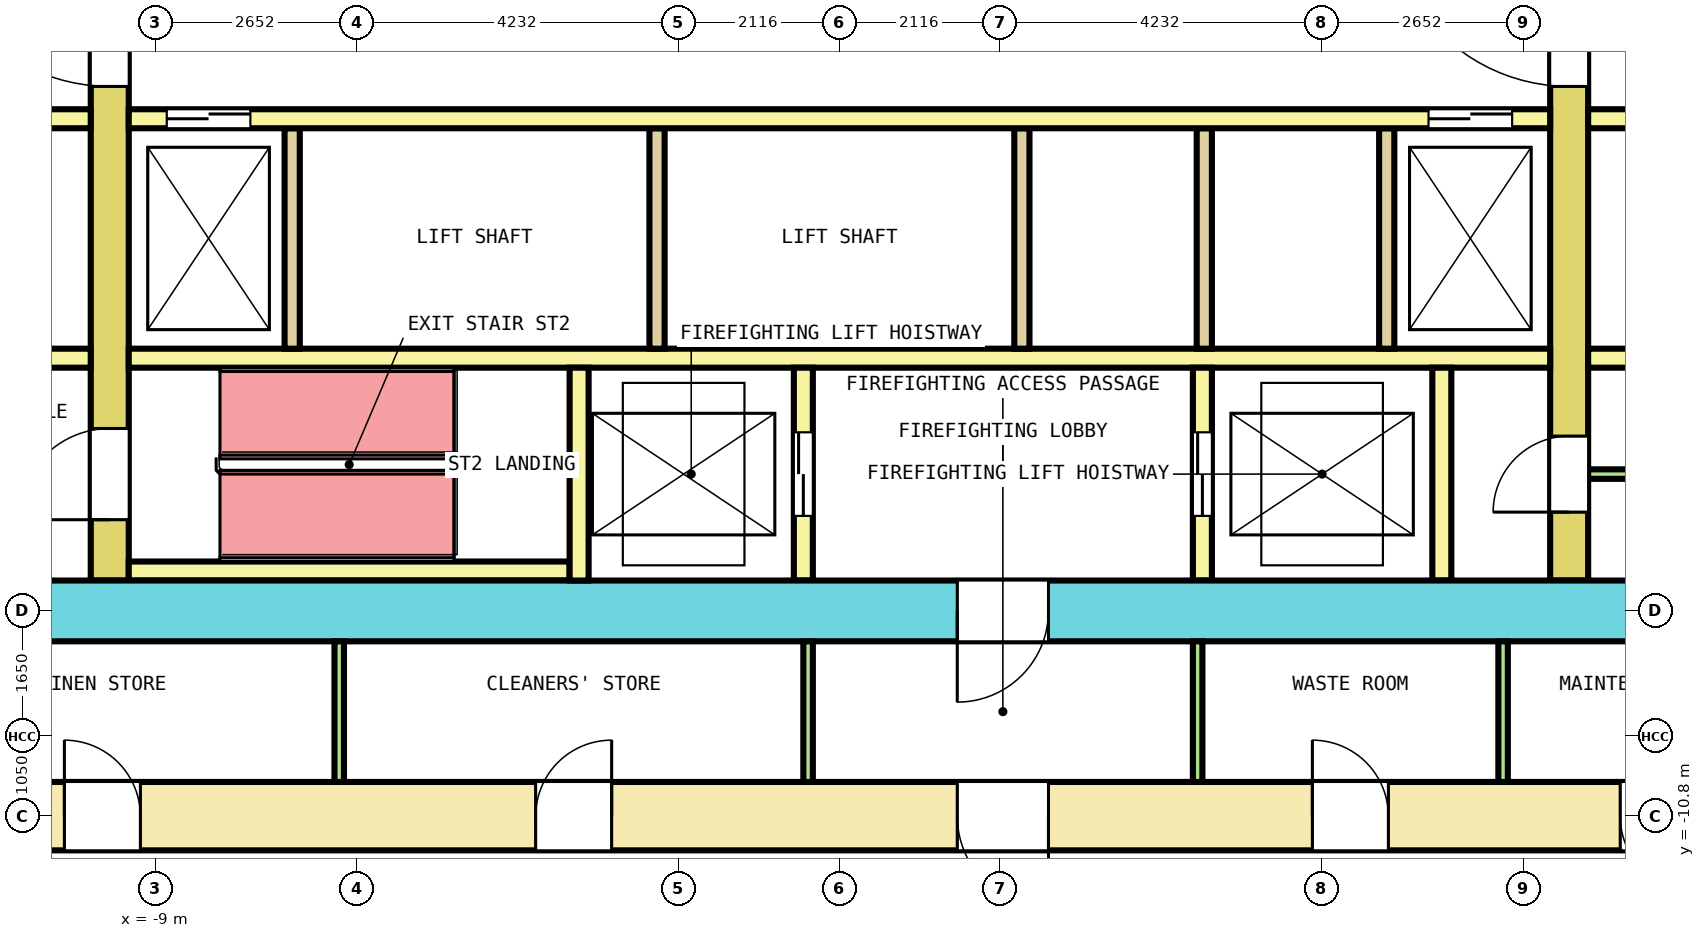
"""IFC4 building model, lengths in metres.
Left out: names, types, materials, properties, quantities, classifications, styles, units other than length and angle.
Written with IfcOpenShell. Run it as: python <this file> out.ifc"""

import sys

from ifc_helpers import new_model, si_unit, direction, frame, frame_2d, origin, place, context, subcontext, project, spatial, rectangle, extrude, element, fill, save


model = new_model("IFC4")
c1 = context("Model", 3, precision=1e-05, world=origin(), true_north=direction((0.0, 1.0)))
c2 = subcontext(c1, "Body", "Model", "MODEL_VIEW")
j1 = project(units=[si_unit("LENGTHUNIT", "METRE"), si_unit("PLANEANGLEUNIT", "RADIAN")], contexts=[c1])
p1 = place(None, origin())
s1 = spatial("IfcSite", under=j1, at=p1, CompositionType="ELEMENT")
p2 = place(p1, origin())
s2 = spatial("IfcBuilding", under=s1, at=p2, CompositionType="ELEMENT")
p3 = place(p2, frame((0.0, 0.0, 27.8)))
s3 = spatial("IfcBuildingStorey", under=s2, at=p3, CompositionType="ELEMENT", Elevation=27.8)
p4 = place(p3, frame((-13.65, -10.8, 0.0), z_axis=(0.0, 0.0, 1.0), x_axis=(1.0, 0.0, 0.0)))
e1 = element("IfcWall", 1, at=p4, inside=s3, PredefinedType="SHEAR", context=c2, shape_type="SweptSolid", body=[
    extrude(rectangle(XDim=27.3, YDim=0.9, at=frame_2d((13.65, 0.0))), origin(), (0.0, 0.0, 1.0), 4.1),
])
p5 = place(p4, frame((3.453, 0.0, 0.0)))
e2 = element("IfcOpeningElement", 2, at=p5, cuts=e1, PredefinedType="OPENING", context=c2, shape_type="SweptSolid", body=[
    extrude(rectangle(XDim=1.0, YDim=2.1, at=frame_2d((0.5, 1.05))), frame((0.0, 0.46, 0.0), z_axis=(0.0, -1.0, 0.0), x_axis=(1.0, 0.0, 0.0)), (0.0, 0.0, 1.0), 0.92),
])
p6 = place(p4, frame((9.653, 0.0, 0.0)))
e3 = element("IfcOpeningElement", 3, at=p6, cuts=e1, PredefinedType="OPENING", context=c2, shape_type="SweptSolid", body=[
    extrude(rectangle(XDim=1.0, YDim=2.1, at=frame_2d((0.5, 1.05))), frame((0.0, 0.46, 0.0), z_axis=(0.0, -1.0, 0.0), x_axis=(1.0, 0.0, 0.0)), (0.0, 0.0, 1.0), 0.92),
])
p7 = place(p4, frame((19.872, 0.0, 0.0)))
e4 = element("IfcOpeningElement", 4, at=p7, cuts=e1, PredefinedType="OPENING", context=c2, shape_type="SweptSolid", body=[
    extrude(rectangle(XDim=1.0, YDim=2.1, at=frame_2d((0.5, 1.05))), frame((0.0, 0.46, 0.0), z_axis=(0.0, -1.0, 0.0), x_axis=(1.0, 0.0, 0.0)), (0.0, 0.0, 1.0), 0.92),
])
p8 = place(p4, frame((23.922, 0.0, 0.0)))
e5 = element("IfcOpeningElement", 5, at=p8, cuts=e1, PredefinedType="OPENING", context=c2, shape_type="SweptSolid", body=[
    extrude(rectangle(XDim=1.0, YDim=2.1, at=frame_2d((0.5, 1.05))), frame((0.0, 0.46, 0.0), z_axis=(0.0, -1.0, 0.0), x_axis=(1.0, 0.0, 0.0)), (0.0, 0.0, 1.0), 0.92),
])
p9 = place(p4, frame((15.2, 0.0, 0.0)))
e6 = element("IfcOpeningElement", 6, at=p9, cuts=e1, PredefinedType="OPENING", context=c2, shape_type="SweptSolid", body=[
    extrude(rectangle(XDim=1.2, YDim=2.1, at=frame_2d((0.6, 1.05))), frame((0.0, 0.46, 0.0), z_axis=(0.0, -1.0, 0.0), x_axis=(1.0, 0.0, 0.0)), (0.0, 0.0, 1.0), 0.92),
])
p10 = place(p3, frame((-12.75, -8.1, 0.0), z_axis=(0.0, 0.0, 1.0), x_axis=(1.0, 0.0, 0.0)))
e7 = element("IfcWall", 7, at=p10, inside=s3, PredefinedType="SHEAR", context=c2, shape_type="SweptSolid", body=[
    extrude(rectangle(XDim=25.5, YDim=0.8, at=frame_2d((12.75, 0.0))), origin(), (0.0, 0.0, 1.0), 4.1),
])
p11 = place(p10, frame((14.3, 0.0, 0.0)))
e8 = element("IfcOpeningElement", 8, at=p11, cuts=e7, PredefinedType="OPENING", context=c2, shape_type="SweptSolid", body=[
    extrude(rectangle(XDim=1.2, YDim=2.1, at=frame_2d((0.6, 1.05))), frame((0.0, 0.41, 0.0), z_axis=(0.0, -1.0, 0.0), x_axis=(1.0, 0.0, 0.0)), (0.0, 0.0, 1.0), 0.82),
])
p12 = place(p3, frame((-9.6, -7.7, 0.0), z_axis=(0.0, 0.0, 1.0), x_axis=(0.0, 1.0, 0.0)))
e9 = element("IfcWall", 9, at=p12, inside=s3, PredefinedType="SHEAR", context=c2, shape_type="SweptSolid", body=[
    extrude(rectangle(XDim=15.4, YDim=0.5, at=frame_2d((7.7, 0.0))), origin(), (0.0, 0.0, 1.0), 4.1),
])
p13 = place(p12, frame((6.5, 0.0, 0.0)))
e10 = element("IfcOpeningElement", 10, at=p13, cuts=e9, PredefinedType="OPENING", context=c2, shape_type="SweptSolid", body=[
    extrude(rectangle(XDim=2.4, YDim=2.1, at=frame_2d((1.2, 1.05))), frame((0.0, 0.26, 0.0), z_axis=(0.0, -1.0, 0.0), x_axis=(1.0, 0.0, 0.0)), (0.0, 0.0, 1.0), 0.52),
])
p14 = place(p12, frame((13.4, 0.0, 0.0)))
e11 = element("IfcOpeningElement", 11, at=p14, cuts=e9, PredefinedType="OPENING", context=c2, shape_type="SweptSolid", body=[
    extrude(rectangle(XDim=1.2, YDim=2.1, at=frame_2d((0.6, 1.05))), frame((0.0, 0.26, 0.0), z_axis=(0.0, -1.0, 0.0), x_axis=(1.0, 0.0, 0.0)), (0.0, 0.0, 1.0), 0.52),
])
p15 = place(p12, frame((0.8, 0.0, 0.0)))
e12 = element("IfcOpeningElement", 12, at=p15, cuts=e9, PredefinedType="OPENING", context=c2, shape_type="SweptSolid", body=[
    extrude(rectangle(XDim=1.2, YDim=2.1, at=frame_2d((0.6, 1.05))), frame((0.0, 0.26, 0.0), z_axis=(0.0, -1.0, 0.0), x_axis=(1.0, 0.0, 0.0)), (0.0, 0.0, 1.0), 0.52),
])
p16 = place(p3, frame((9.6, -7.7, 0.0), z_axis=(0.0, 0.0, 1.0), x_axis=(0.0, 1.0, 0.0)))
e13 = element("IfcWall", 13, at=p16, inside=s3, PredefinedType="SHEAR", context=c2, shape_type="SweptSolid", body=[
    extrude(rectangle(XDim=15.4, YDim=0.5, at=frame_2d((7.7, 0.0))), origin(), (0.0, 0.0, 1.0), 4.1),
])
p17 = place(p16, frame((6.5, 0.0, 0.0)))
e14 = element("IfcOpeningElement", 14, at=p17, cuts=e13, PredefinedType="OPENING", context=c2, shape_type="SweptSolid", body=[
    extrude(rectangle(XDim=2.4, YDim=2.1, at=frame_2d((1.2, 1.05))), frame((0.0, 0.26, 0.0), z_axis=(0.0, -1.0, 0.0), x_axis=(1.0, 0.0, 0.0)), (0.0, 0.0, 1.0), 0.52),
])
p18 = place(p16, frame((13.4, 0.0, 0.0)))
e15 = element("IfcOpeningElement", 15, at=p18, cuts=e13, PredefinedType="OPENING", context=c2, shape_type="SweptSolid", body=[
    extrude(rectangle(XDim=1.2, YDim=2.1, at=frame_2d((0.6, 1.05))), frame((0.0, 0.26, 0.0), z_axis=(0.0, -1.0, 0.0), x_axis=(1.0, 0.0, 0.0)), (0.0, 0.0, 1.0), 0.52),
])
p19 = place(p16, frame((0.9, 0.0, 0.0)))
e16 = element("IfcOpeningElement", 16, at=p19, cuts=e13, PredefinedType="OPENING", context=c2, shape_type="SweptSolid", body=[
    extrude(rectangle(XDim=1.0, YDim=2.1, at=frame_2d((0.5, 1.05))), frame((0.0, 0.26, 0.0), z_axis=(0.0, -1.0, 0.0), x_axis=(1.0, 0.0, 0.0)), (0.0, 0.0, 1.0), 0.52),
])
p20 = place(p3, frame((-12.75, -1.625, 0.0), z_axis=(0.0, 0.0, 1.0), x_axis=(1.0, 0.0, 0.0)))
e17 = element("IfcWall", 17, at=p20, inside=s3, PredefinedType="SOLIDWALL", context=c2, shape_type="SweptSolid", body=[
    extrude(rectangle(XDim=2.9, YDim=0.25, at=frame_2d((1.45, 0.0))), origin(), (0.0, 0.0, 1.0), 4.1),
])
p21 = place(p20, frame((0.9, 0.0, 0.0)))
e18 = element("IfcOpeningElement", 18, at=p21, cuts=e17, PredefinedType="OPENING", context=c2, shape_type="SweptSolid", body=[
    extrude(rectangle(XDim=1.1, YDim=2.1, at=frame_2d((0.55, 1.05))), frame((0.0, 0.135, 0.0), z_axis=(0.0, -1.0, 0.0), x_axis=(1.0, 0.0, 0.0)), (0.0, 0.0, 1.0), 0.27),
])
p22 = place(p3, frame((-9.35, -1.625, 0.0), z_axis=(0.0, 0.0, 1.0), x_axis=(1.0, 0.0, 0.0)))
e19 = element("IfcWall", 19, at=p22, inside=s3, PredefinedType="SOLIDWALL", context=c2, shape_type="SweptSolid", body=[
    extrude(rectangle(XDim=18.7, YDim=0.25, at=frame_2d((9.35, 0.0))), origin(), (0.0, 0.0, 1.0), 4.1),
])
p23 = place(p22, frame((0.5, 0.0, 0.0)))
e20 = element("IfcOpeningElement", 20, at=p23, cuts=e19, PredefinedType="OPENING", context=c2, shape_type="SweptSolid", body=[
    extrude(rectangle(XDim=1.1, YDim=2.1, at=frame_2d((0.55, 1.05))), frame((0.0, 0.135, 0.0), z_axis=(0.0, -1.0, 0.0), x_axis=(1.0, 0.0, 0.0)), (0.0, 0.0, 1.0), 0.27),
])
p24 = place(p22, frame((17.1, 0.0, 0.0)))
e21 = element("IfcOpeningElement", 21, at=p24, cuts=e19, PredefinedType="OPENING", context=c2, shape_type="SweptSolid", body=[
    extrude(rectangle(XDim=1.1, YDim=2.1, at=frame_2d((0.55, 1.05))), frame((0.0, 0.135, 0.0), z_axis=(0.0, -1.0, 0.0), x_axis=(1.0, 0.0, 0.0)), (0.0, 0.0, 1.0), 0.27),
])
p25 = place(p3, frame((9.85, -1.625, 0.0), z_axis=(0.0, 0.0, 1.0), x_axis=(1.0, 0.0, 0.0)))
e22 = element("IfcWall", 22, at=p25, inside=s3, PredefinedType="SOLIDWALL", context=c2, shape_type="SweptSolid", body=[
    extrude(rectangle(XDim=2.9, YDim=0.25, at=frame_2d((1.45, 0.0))), origin(), (0.0, 0.0, 1.0), 4.1),
])
p26 = place(p25, frame((0.9, 0.0, 0.0)))
e23 = element("IfcOpeningElement", 23, at=p26, cuts=e22, PredefinedType="OPENING", context=c2, shape_type="SweptSolid", body=[
    extrude(rectangle(XDim=1.1, YDim=2.1, at=frame_2d((0.55, 1.05))), frame((0.0, 0.135, 0.0), z_axis=(0.0, -1.0, 0.0), x_axis=(1.0, 0.0, 0.0)), (0.0, 0.0, 1.0), 0.27),
])
p27 = place(p3, frame((-12.75, -4.775, 0.0), z_axis=(0.0, 0.0, 1.0), x_axis=(1.0, 0.0, 0.0)))
e24 = element("IfcWall", 24, at=p27, inside=s3, PredefinedType="SOLIDWALL", context=c2, shape_type="SweptSolid", body=[
    extrude(rectangle(XDim=2.9, YDim=0.25, at=frame_2d((1.45, 0.0))), origin(), (0.0, 0.0, 1.0), 4.1),
])
p28 = place(p3, frame((-9.35, -4.775, 0.0), z_axis=(0.0, 0.0, 1.0), x_axis=(1.0, 0.0, 0.0)))
e25 = element("IfcWall", 25, at=p28, inside=s3, PredefinedType="SOLIDWALL", context=c2, shape_type="SweptSolid", body=[
    extrude(rectangle(XDim=18.7, YDim=0.25, at=frame_2d((9.35, 0.0))), origin(), (0.0, 0.0, 1.0), 4.1),
])
p29 = place(p3, frame((9.85, -4.775, 0.0), z_axis=(0.0, 0.0, 1.0), x_axis=(1.0, 0.0, 0.0)))
e26 = element("IfcWall", 26, at=p29, inside=s3, PredefinedType="SOLIDWALL", context=c2, shape_type="SweptSolid", body=[
    extrude(rectangle(XDim=2.9, YDim=0.25, at=frame_2d((1.45, 0.0))), origin(), (0.0, 0.0, 1.0), 4.1),
])
for number, where, z_axis, x_axis in (
    (27, (-7.2, -4.65, 0.0), (0.0, 0.0, 1.0), (0.0, 1.0, 0.0)),
    (28, (-2.4, -4.65, 0.0), (0.0, 0.0, 1.0), (0.0, 1.0, 0.0)),
    (29, (2.4, -4.65, 0.0), (0.0, 0.0, 1.0), (0.0, 1.0, 0.0)),
    (30, (4.8, -4.65, 0.0), (0.0, 0.0, 1.0), (0.0, 1.0, 0.0)),
    (31, (7.2, -4.65, 0.0), (0.0, 0.0, 1.0), (0.0, 1.0, 0.0)),
):
    element("IfcWall", number, at=place(p3, frame(where, z_axis=z_axis, x_axis=x_axis)), inside=s3, PredefinedType="SOLIDWALL", context=c2, shape_type="SweptSolid", body=[
        extrude(rectangle(XDim=2.9, YDim=0.2, at=frame_2d((1.45, 0.0))), origin(), (0.0, 0.0, 1.0), 4.1),
    ])
p30 = place(p3, frame((-9.35, -7.575, 0.0), z_axis=(0.0, 0.0, 1.0), x_axis=(1.0, 0.0, 0.0)))
e32 = element("IfcWall", 32, at=p30, inside=s3, PredefinedType="SOLIDWALL", context=c2, shape_type="SweptSolid", body=[
    extrude(rectangle(XDim=5.8, YDim=0.25, at=frame_2d((2.9, 0.0))), origin(), (0.0, 0.0, 1.0), 4.1),
])
p31 = place(p3, frame((-3.425, -7.7, 0.0), z_axis=(0.0, 0.0, 1.0), x_axis=(0.0, 1.0, 0.0)))
e33 = element("IfcWall", 33, at=p31, inside=s3, PredefinedType="SOLIDWALL", context=c2, shape_type="SweptSolid", body=[
    extrude(rectangle(XDim=2.8, YDim=0.25, at=frame_2d((1.4, 0.0))), origin(), (0.0, 0.0, 1.0), 4.1),
])
p32 = place(p3, frame((-0.475, -7.7, 0.0), z_axis=(0.0, 0.0, 1.0), x_axis=(0.0, 1.0, 0.0)))
e34 = element("IfcWall", 34, at=p32, inside=s3, PredefinedType="SOLIDWALL", context=c2, shape_type="SweptSolid", body=[
    extrude(rectangle(XDim=2.8, YDim=0.25, at=frame_2d((1.4, 0.0))), origin(), (0.0, 0.0, 1.0), 4.1),
])
p33 = place(p32, frame((0.85, 0.0, 0.0)))
e35 = element("IfcOpeningElement", 35, at=p33, cuts=e34, PredefinedType="OPENING", context=c2, shape_type="SweptSolid", body=[
    extrude(rectangle(XDim=1.1, YDim=2.1, at=frame_2d((0.55, 1.05))), frame((0.0, 0.135, 0.0), z_axis=(0.0, -1.0, 0.0), x_axis=(1.0, 0.0, 0.0)), (0.0, 0.0, 1.0), 0.27),
])
p34 = place(p3, frame((4.775, -7.7, 0.0), z_axis=(0.0, 0.0, 1.0), x_axis=(0.0, 1.0, 0.0)))
e36 = element("IfcWall", 36, at=p34, inside=s3, PredefinedType="SOLIDWALL", context=c2, shape_type="SweptSolid", body=[
    extrude(rectangle(XDim=2.8, YDim=0.25, at=frame_2d((1.4, 0.0))), origin(), (0.0, 0.0, 1.0), 4.1),
])
p35 = place(p34, frame((0.85, 0.0, 0.0)))
e37 = element("IfcOpeningElement", 37, at=p35, cuts=e36, PredefinedType="OPENING", context=c2, shape_type="SweptSolid", body=[
    extrude(rectangle(XDim=1.1, YDim=2.1, at=frame_2d((0.55, 1.05))), frame((0.0, 0.135, 0.0), z_axis=(0.0, -1.0, 0.0), x_axis=(1.0, 0.0, 0.0)), (0.0, 0.0, 1.0), 0.27),
])
p36 = place(p3, frame((7.925, -7.7, 0.0), z_axis=(0.0, 0.0, 1.0), x_axis=(0.0, 1.0, 0.0)))
e38 = element("IfcWall", 38, at=p36, inside=s3, PredefinedType="SOLIDWALL", context=c2, shape_type="SweptSolid", body=[
    extrude(rectangle(XDim=2.8, YDim=0.25, at=frame_2d((1.4, 0.0))), origin(), (0.0, 0.0, 1.0), 4.1),
])
p37 = place(p3, frame((9.85, -6.3, 0.0), z_axis=(0.0, 0.0, 1.0), x_axis=(1.0, 0.0, 0.0)))
e39 = element("IfcWall", 39, at=p37, inside=s3, PredefinedType="PARTITIONING", context=c2, shape_type="SweptSolid", body=[
    extrude(rectangle(XDim=2.9, YDim=0.125, at=frame_2d((1.45, 0.0))), origin(), (0.0, 0.0, 1.0), 4.1),
])
for number, where, z_axis, x_axis in (
    (40, (-6.581, -10.35, 0.0), (0.0, 0.0, 1.0), (0.0, 1.0, 0.0)),
    (41, (-0.413, -10.35, 0.0), (0.0, 0.0, 1.0), (0.0, 1.0, 0.0)),
    (42, (4.712, -10.35, 0.0), (0.0, 0.0, 1.0), (0.0, 1.0, 0.0)),
    (43, (8.731, -10.35, 0.0), (0.0, 0.0, 1.0), (0.0, 1.0, 0.0)),
):
    element("IfcWall", number, at=place(p3, frame(where, z_axis=z_axis, x_axis=x_axis)), inside=s3, PredefinedType="PARTITIONING", context=c2, shape_type="SweptSolid", body=[
        extrude(rectangle(XDim=1.85, YDim=0.125, at=frame_2d((0.925, 0.0))), origin(), (0.0, 0.0, 1.0), 4.1),
    ])
p38 = place(p23, origin())
e44 = element("IfcDoor", 44, at=p38, inside=s3, OperationType="DOUBLE_DOOR_SLIDING", PredefinedType="DOOR", context=c2, shape_type="SweptSolid", body=[
    extrude(rectangle(XDim=1.1, YDim=2.1, at=frame_2d((0.55, 1.05))), frame((0.0, 0.075, 0.0), z_axis=(0.0, -1.0, 0.0), x_axis=(1.0, 0.0, 0.0)), (0.0, 0.0, 1.0), 0.15),
])
fill(e20, e44)
p39 = place(p24, origin())
e45 = element("IfcDoor", 45, at=p39, inside=s3, OperationType="DOUBLE_DOOR_SLIDING", PredefinedType="DOOR", context=c2, shape_type="SweptSolid", body=[
    extrude(rectangle(XDim=1.1, YDim=2.1, at=frame_2d((0.55, 1.05))), frame((0.0, 0.075, 0.0), z_axis=(0.0, -1.0, 0.0), x_axis=(1.0, 0.0, 0.0)), (0.0, 0.0, 1.0), 0.15),
])
fill(e21, e45)
p40 = place(p33, origin())
e46 = element("IfcDoor", 46, at=p40, inside=s3, OperationType="DOUBLE_DOOR_SLIDING", PredefinedType="DOOR", context=c2, shape_type="SweptSolid", body=[
    extrude(rectangle(XDim=1.1, YDim=2.1, at=frame_2d((0.55, 1.05))), frame((0.0, 0.075, 0.0), z_axis=(0.0, -1.0, 0.0), x_axis=(1.0, 0.0, 0.0)), (0.0, 0.0, 1.0), 0.15),
])
fill(e35, e46)
p41 = place(p35, origin())
e47 = element("IfcDoor", 47, at=p41, inside=s3, OperationType="DOUBLE_DOOR_SLIDING", PredefinedType="DOOR", context=c2, shape_type="SweptSolid", body=[
    extrude(rectangle(XDim=1.1, YDim=2.1, at=frame_2d((0.55, 1.05))), frame((0.0, 0.075, 0.0), z_axis=(0.0, -1.0, 0.0), x_axis=(1.0, 0.0, 0.0)), (0.0, 0.0, 1.0), 0.15),
])
fill(e37, e47)
p42 = place(p13, origin())
e48 = element("IfcDoor", 48, at=p42, inside=s3, OperationType="DOUBLE_DOOR_SINGLE_SWING", PredefinedType="DOOR", context=c2, shape_type="SweptSolid", body=[
    extrude(rectangle(XDim=2.4, YDim=2.1, at=frame_2d((1.2, 1.05))), frame((0.0, 0.2, 0.0), z_axis=(0.0, -1.0, 0.0), x_axis=(1.0, 0.0, 0.0)), (0.0, 0.0, 1.0), 0.4),
])
fill(e10, e48)
p43 = place(p17, origin())
e49 = element("IfcDoor", 49, at=p43, inside=s3, OperationType="DOUBLE_DOOR_SINGLE_SWING", PredefinedType="DOOR", context=c2, shape_type="SweptSolid", body=[
    extrude(rectangle(XDim=2.4, YDim=2.1, at=frame_2d((1.2, 1.05))), frame((0.0, 0.2, 0.0), z_axis=(0.0, -1.0, 0.0), x_axis=(1.0, 0.0, 0.0)), (0.0, 0.0, 1.0), 0.4),
])
fill(e14, e49)
p44 = place(p15, origin())
e50 = element("IfcDoor", 50, at=p44, inside=s3, OperationType="SINGLE_SWING_RIGHT", PredefinedType="DOOR", context=c2, shape_type="SweptSolid", body=[
    extrude(rectangle(XDim=1.2, YDim=2.1, at=frame_2d((0.6, 1.05))), frame((0.0, 0.2, 0.0), z_axis=(0.0, -1.0, 0.0), x_axis=(1.0, 0.0, 0.0)), (0.0, 0.0, 1.0), 0.4),
])
fill(e12, e50)
p45 = place(p11, origin())
e51 = element("IfcDoor", 51, at=p45, inside=s3, OperationType="SINGLE_SWING_RIGHT", PredefinedType="DOOR", context=c2, shape_type="SweptSolid", body=[
    extrude(rectangle(XDim=1.2, YDim=2.1, at=frame_2d((0.6, 1.05))), frame((0.0, 0.3, 0.0), z_axis=(0.0, -1.0, 0.0), x_axis=(1.0, 0.0, 0.0)), (0.0, 0.0, 1.0), 0.6),
])
fill(e8, e51)
p46 = place(p19, origin())
e52 = element("IfcDoor", 52, at=p46, inside=s3, OperationType="SINGLE_SWING_RIGHT", PredefinedType="DOOR", context=c2, shape_type="SweptSolid", body=[
    extrude(rectangle(XDim=1.0, YDim=2.1, at=frame_2d((0.5, 1.05))), frame((0.0, 0.2, 0.0), z_axis=(0.0, -1.0, 0.0), x_axis=(1.0, 0.0, 0.0)), (0.0, 0.0, 1.0), 0.4),
])
fill(e16, e52)
p47 = place(p5, origin())
e53 = element("IfcDoor", 53, at=p47, inside=s3, OperationType="SINGLE_SWING_LEFT", PredefinedType="DOOR", context=c2, shape_type="SweptSolid", body=[
    extrude(rectangle(XDim=1.0, YDim=2.1, at=frame_2d((0.5, 1.05))), frame((0.0, 0.3, 0.0), z_axis=(0.0, -1.0, 0.0), x_axis=(1.0, 0.0, 0.0)), (0.0, 0.0, 1.0), 0.6),
])
fill(e2, e53)
p48 = place(p6, origin())
e54 = element("IfcDoor", 54, at=p48, inside=s3, OperationType="SINGLE_SWING_RIGHT", PredefinedType="DOOR", context=c2, shape_type="SweptSolid", body=[
    extrude(rectangle(XDim=1.0, YDim=2.1, at=frame_2d((0.5, 1.05))), frame((0.0, 0.3, 0.0), z_axis=(0.0, -1.0, 0.0), x_axis=(1.0, 0.0, 0.0)), (0.0, 0.0, 1.0), 0.6),
])
fill(e3, e54)
p49 = place(p7, origin())
e55 = element("IfcDoor", 55, at=p49, inside=s3, OperationType="SINGLE_SWING_LEFT", PredefinedType="DOOR", context=c2, shape_type="SweptSolid", body=[
    extrude(rectangle(XDim=1.0, YDim=2.1, at=frame_2d((0.5, 1.05))), frame((0.0, 0.3, 0.0), z_axis=(0.0, -1.0, 0.0), x_axis=(1.0, 0.0, 0.0)), (0.0, 0.0, 1.0), 0.6),
])
fill(e4, e55)
p50 = place(p8, origin())
e56 = element("IfcDoor", 56, at=p50, inside=s3, OperationType="SINGLE_SWING_RIGHT", PredefinedType="DOOR", context=c2, shape_type="SweptSolid", body=[
    extrude(rectangle(XDim=1.0, YDim=2.1, at=frame_2d((0.5, 1.05))), frame((0.0, 0.3, 0.0), z_axis=(0.0, -1.0, 0.0), x_axis=(1.0, 0.0, 0.0)), (0.0, 0.0, 1.0), 0.6),
])
fill(e5, e56)
p51 = place(p9, origin())
e57 = element("IfcDoor", 57, at=p51, inside=s3, OperationType="SINGLE_SWING_LEFT", PredefinedType="DOOR", context=c2, shape_type="SweptSolid", body=[
    extrude(rectangle(XDim=1.2, YDim=2.1, at=frame_2d((0.6, 1.05))), frame((0.0, 0.3, 0.0), z_axis=(0.0, -1.0, 0.0), x_axis=(1.0, 0.0, 0.0)), (0.0, 0.0, 1.0), 0.6),
])
fill(e6, e57)
save(model, sys.argv[1])
